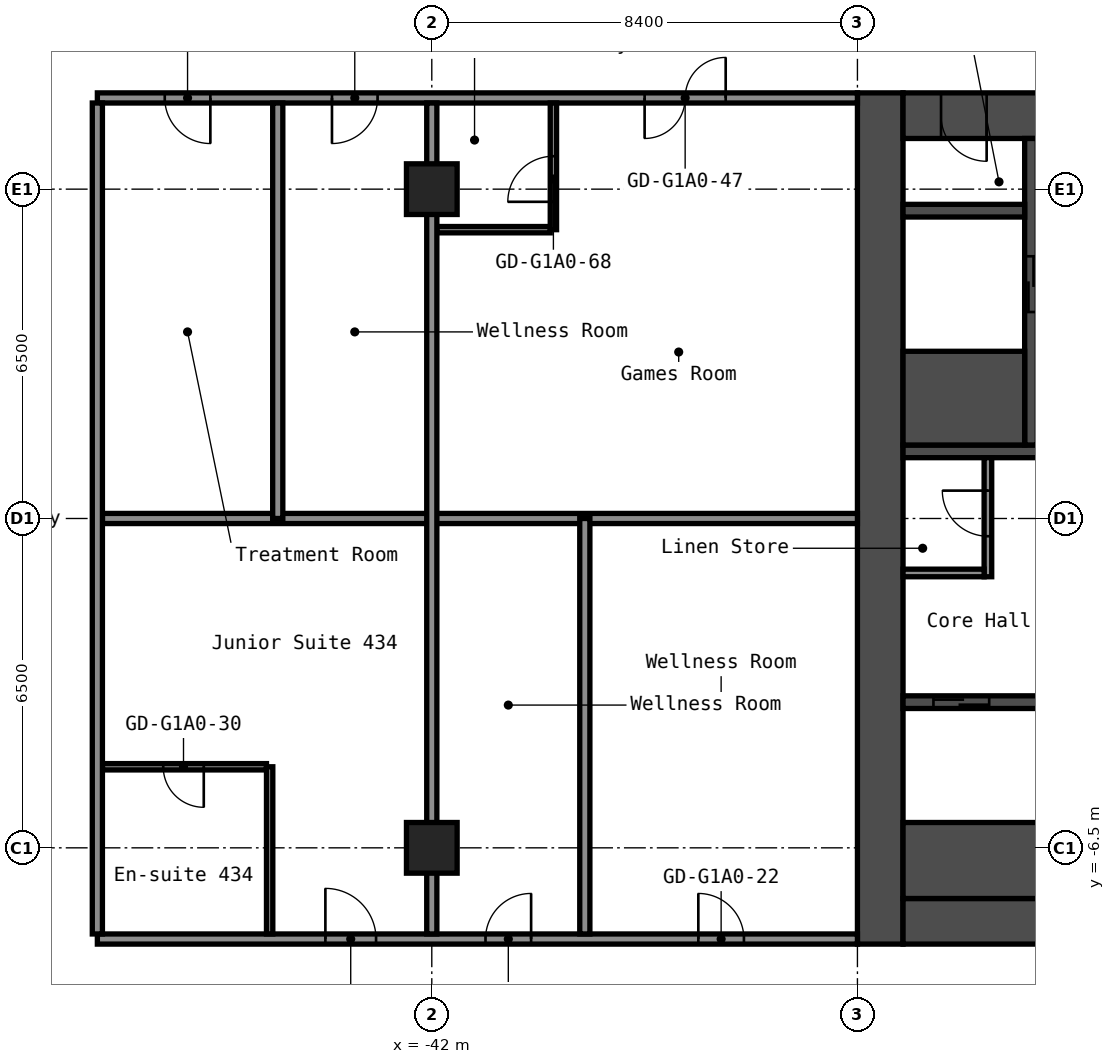
"""IFC4 building model, lengths in metres.
Left out: names, types, materials, properties, quantities, classifications, styles, units other than length and angle.
Written with IfcOpenShell. Run it as: python <this file> out.ifc"""

import sys

from ifc_helpers import new_model, si_unit, direction, frame, frame_2d, origin, origin_2d, place, context, subcontext, project, spatial, rectangle, hollow_rectangle, extrude, element, fill, save


model = new_model("IFC4")
c1 = context("Model", 3, precision=1e-05, world=origin(), true_north=direction((0.0, 1.0)))
c2 = subcontext(c1, "Body", "Model", "MODEL_VIEW")
j1 = project(units=[si_unit("LENGTHUNIT", "METRE"), si_unit("PLANEANGLEUNIT", "RADIAN")], contexts=[c1])
p1 = place(None, origin())
s1 = spatial("IfcSite", under=j1, at=p1, CompositionType="ELEMENT")
p2 = place(p1, origin())
s2 = spatial("IfcBuilding", under=s1, at=p2, CompositionType="ELEMENT")
p3 = place(p2, frame((0.0, 0.0, 19.8)))
s3 = spatial("IfcBuildingStorey", under=s2, at=p3, CompositionType="ELEMENT", Elevation=19.8)
for number, where, z_axis, x_axis in (
    (1, (-42.0, -6.5, 0.0), (0.0, 0.0, 1.0), (1.0, 0.0, 0.0)),
    (2, (-42.0, 6.5, 0.0), (0.0, 0.0, 1.0), (1.0, 0.0, 0.0)),
):
    element("IfcColumn", number, at=place(p3, frame(where, z_axis=z_axis, x_axis=x_axis)), inside=s3, PredefinedType="COLUMN", context=c2, shape_type="SweptSolid", body=[
        extrude(hollow_rectangle(XDim=1.0, YDim=1.0, WallThickness=0.04, at=origin_2d()), origin(), (0.0, 0.0, 1.0), 2.8),
    ])
p4 = place(p3, frame((-33.15, -8.4, 0.0), z_axis=(0.0, 0.0, 1.0), x_axis=(0.0, 1.0, 0.0)))
e3 = element("IfcWall", 3, at=p4, inside=s3, PredefinedType="SHEAR", context=c2, shape_type="SweptSolid", body=[
    extrude(rectangle(XDim=16.8, YDim=0.9, at=frame_2d((8.4, 0.0))), origin(), (0.0, 0.0, 1.0), 2.8),
])
p5 = place(p3, frame((-32.7, 7.95, 0.0), z_axis=(0.0, 0.0, 1.0), x_axis=(1.0, 0.0, 0.0)))
e4 = element("IfcWall", 4, at=p5, inside=s3, PredefinedType="SHEAR", context=c2, shape_type="SweptSolid", body=[
    extrude(rectangle(XDim=15.0, YDim=0.9, at=frame_2d((7.5, 0.0))), origin(), (0.0, 0.0, 1.0), 2.8),
])
p6 = place(p5, frame((3.4, 0.0, 0.0)))
e5 = element("IfcOpeningElement", 5, at=p6, cuts=e4, PredefinedType="OPENING", context=c2, shape_type="SweptSolid", body=[
    extrude(rectangle(XDim=1.2, YDim=2.1, at=frame_2d((0.6, 1.05))), frame((0.0, 0.46, 0.0), z_axis=(0.0, -1.0, 0.0), x_axis=(1.0, 0.0, 0.0)), (0.0, 0.0, 1.0), 0.92),
])
p7 = place(p5, frame((0.75, 0.0, 0.0)))
e6 = element("IfcOpeningElement", 6, at=p7, cuts=e4, PredefinedType="OPENING", context=c2, shape_type="SweptSolid", body=[
    extrude(rectangle(XDim=0.9, YDim=2.1, at=frame_2d((0.45, 1.05))), frame((0.0, 0.46, 0.0), z_axis=(0.0, -1.0, 0.0), x_axis=(1.0, 0.0, 0.0)), (0.0, 0.0, 1.0), 0.92),
])
p8 = place(p3, frame((-32.7, -7.95, 0.0), z_axis=(0.0, 0.0, 1.0), x_axis=(1.0, 0.0, 0.0)))
e7 = element("IfcWall", 7, at=p8, inside=s3, PredefinedType="SHEAR", context=c2, shape_type="SweptSolid", body=[
    extrude(rectangle(XDim=15.0, YDim=0.9, at=frame_2d((7.5, 0.0))), origin(), (0.0, 0.0, 1.0), 2.8),
])
p9 = place(p8, frame((11.45, 0.0, 0.0)))
e8 = element("IfcOpeningElement", 8, at=p9, cuts=e7, PredefinedType="OPENING", context=c2, shape_type="SweptSolid", body=[
    extrude(rectangle(XDim=1.0, YDim=2.1, at=frame_2d((0.5, 1.05))), frame((0.0, 0.46, 0.0), z_axis=(0.0, -1.0, 0.0), x_axis=(1.0, 0.0, 0.0)), (0.0, 0.0, 1.0), 0.92),
])
p10 = place(p3, frame((-32.7, 1.325, 0.0), z_axis=(0.0, 0.0, 1.0), x_axis=(1.0, 0.0, 0.0)))
e9 = element("IfcWall", 9, at=p10, inside=s3, PredefinedType="SHEAR", context=c2, shape_type="SweptSolid", body=[
    extrude(rectangle(XDim=5.05, YDim=0.25, at=frame_2d((2.525, 0.0))), origin(), (0.0, 0.0, 1.0), 2.8),
])
p11 = place(p10, frame((3.3, 0.0, 0.0)))
e10 = element("IfcOpeningElement", 10, at=p11, cuts=e9, PredefinedType="OPENING", context=c2, shape_type="SweptSolid", body=[
    extrude(rectangle(XDim=1.2, YDim=2.1, at=frame_2d((0.6, 1.05))), frame((0.0, 0.135, 0.0), z_axis=(0.0, -1.0, 0.0), x_axis=(1.0, 0.0, 0.0)), (0.0, 0.0, 1.0), 0.27),
])
p12 = place(p3, frame((-30.175, 1.45, 0.0), z_axis=(0.0, 0.0, 1.0), x_axis=(0.0, 1.0, 0.0)))
e11 = element("IfcWall", 11, at=p12, inside=s3, PredefinedType="SHEAR", context=c2, shape_type="SweptSolid", body=[
    extrude(rectangle(XDim=6.05, YDim=0.25, at=frame_2d((3.025, 0.0))), origin(), (0.0, 0.0, 1.0), 2.8),
])
p13 = place(p12, frame((2.625, 0.0, 0.0)))
e12 = element("IfcOpeningElement", 12, at=p13, cuts=e11, PredefinedType="OPENING", context=c2, shape_type="SweptSolid", body=[
    extrude(rectangle(XDim=1.1, YDim=2.1, at=frame_2d((0.55, 1.05))), frame((0.0, 0.135, 0.0), z_axis=(0.0, -1.0, 0.0), x_axis=(1.0, 0.0, 0.0)), (0.0, 0.0, 1.0), 0.27),
])
p14 = place(p3, frame((-32.7, 2.375, 0.0), z_axis=(0.0, 0.0, 1.0), x_axis=(1.0, 0.0, 0.0)))
e13 = element("IfcWall", 13, at=p14, inside=s3, PredefinedType="SHEAR", context=c2, shape_type="SweptSolid", body=[
    extrude(rectangle(XDim=2.4, YDim=1.85, at=frame_2d((1.2, 0.0))), origin(), (0.0, 0.0, 1.0), 2.8),
])
p15 = place(p3, frame((-32.7, 6.075, 0.0), z_axis=(0.0, 0.0, 1.0), x_axis=(1.0, 0.0, 0.0)))
e14 = element("IfcWall", 14, at=p15, inside=s3, PredefinedType="SHEAR", context=c2, shape_type="SweptSolid", body=[
    extrude(rectangle(XDim=2.4, YDim=0.25, at=frame_2d((1.2, 0.0))), origin(), (0.0, 0.0, 1.0), 2.8),
])
p16 = place(p3, frame((-32.7, -3.625, 0.0), z_axis=(0.0, 0.0, 1.0), x_axis=(1.0, 0.0, 0.0)))
e15 = element("IfcWall", 15, at=p16, inside=s3, PredefinedType="SHEAR", context=c2, shape_type="SweptSolid", body=[
    extrude(rectangle(XDim=4.55, YDim=0.25, at=frame_2d((2.275, 0.0))), origin(), (0.0, 0.0, 1.0), 2.8),
])
p17 = place(p16, frame((2.85, 0.0, 0.0)))
e16 = element("IfcOpeningElement", 16, at=p17, cuts=e15, PredefinedType="OPENING", context=c2, shape_type="SweptSolid", body=[
    extrude(rectangle(XDim=1.1, YDim=2.1, at=frame_2d((0.55, 1.05))), frame((0.0, 0.135, 0.0), z_axis=(0.0, -1.0, 0.0), x_axis=(1.0, 0.0, 0.0)), (0.0, 0.0, 1.0), 0.27),
])
p18 = place(p16, frame((0.6, 0.0, 0.0)))
e17 = element("IfcOpeningElement", 17, at=p18, cuts=e15, PredefinedType="OPENING", context=c2, shape_type="SweptSolid", body=[
    extrude(rectangle(XDim=1.1, YDim=2.1, at=frame_2d((0.55, 1.05))), frame((0.0, 0.135, 0.0), z_axis=(0.0, -1.0, 0.0), x_axis=(1.0, 0.0, 0.0)), (0.0, 0.0, 1.0), 0.27),
])
p19 = place(p3, frame((-32.7, -6.75, 0.0), z_axis=(0.0, 0.0, 1.0), x_axis=(1.0, 0.0, 0.0)))
e18 = element("IfcWall", 18, at=p19, inside=s3, PredefinedType="SHEAR", context=c2, shape_type="SweptSolid", body=[
    extrude(rectangle(XDim=4.55, YDim=1.5, at=frame_2d((2.275, 0.0))), origin(), (0.0, 0.0, 1.0), 2.8),
])
p20 = place(p3, frame((-31.025, -1.15, 0.0), z_axis=(0.0, 0.0, 1.0), x_axis=(0.0, 1.0, 0.0)))
e19 = element("IfcWall", 19, at=p20, inside=s3, PredefinedType="PARTITIONING", context=c2, shape_type="SweptSolid", body=[
    extrude(rectangle(XDim=2.35, YDim=0.15, at=frame_2d((1.175, 0.0))), origin(), (0.0, 0.0, 1.0), 2.8),
])
p21 = place(p20, frame((0.8, 0.0, 0.0)))
e20 = element("IfcOpeningElement", 20, at=p21, cuts=e19, PredefinedType="OPENING", context=c2, shape_type="SweptSolid", body=[
    extrude(rectangle(XDim=0.9, YDim=2.1, at=frame_2d((0.45, 1.05))), frame((0.0, 0.085, 0.0), z_axis=(0.0, -1.0, 0.0), x_axis=(1.0, 0.0, 0.0)), (0.0, 0.0, 1.0), 0.17),
])
p22 = place(p3, frame((-32.7, -1.075, 0.0), z_axis=(0.0, 0.0, 1.0), x_axis=(1.0, 0.0, 0.0)))
e21 = element("IfcWall", 21, at=p22, inside=s3, PredefinedType="PARTITIONING", context=c2, shape_type="SweptSolid", body=[
    extrude(rectangle(XDim=1.6, YDim=0.15, at=frame_2d((0.8, 0.0))), origin(), (0.0, 0.0, 1.0), 2.8),
])
p23 = place(p3, frame((-48.6, -8.3, 0.0), z_axis=(0.0, 0.0, 1.0), x_axis=(1.0, 0.0, 0.0)))
e22 = element("IfcWall", 22, at=p23, inside=s3, PredefinedType="PARTITIONING", context=c2, shape_type="SweptSolid", body=[
    extrude(rectangle(XDim=15.0, YDim=0.2, at=frame_2d((7.5, 0.0))), origin(), (0.0, 0.0, 1.0), 2.8),
])
p24 = place(p23, frame((4.5, 0.0, 0.0)))
e23 = element("IfcOpeningElement", 23, at=p24, cuts=e22, PredefinedType="OPENING", context=c2, shape_type="SweptSolid", body=[
    extrude(rectangle(XDim=1.0, YDim=2.1, at=frame_2d((0.5, 1.05))), frame((0.0, 0.11, 0.0), z_axis=(0.0, -1.0, 0.0), x_axis=(1.0, 0.0, 0.0)), (0.0, 0.0, 1.0), 0.22),
])
p25 = place(p23, frame((7.66, 0.0, 0.0)))
e24 = element("IfcOpeningElement", 24, at=p25, cuts=e22, PredefinedType="OPENING", context=c2, shape_type="SweptSolid", body=[
    extrude(rectangle(XDim=0.9, YDim=2.1, at=frame_2d((0.45, 1.05))), frame((0.0, 0.11, 0.0), z_axis=(0.0, -1.0, 0.0), x_axis=(1.0, 0.0, 0.0)), (0.0, 0.0, 1.0), 0.22),
])
p26 = place(p23, frame((11.86, 0.0, 0.0)))
e25 = element("IfcOpeningElement", 25, at=p26, cuts=e22, PredefinedType="OPENING", context=c2, shape_type="SweptSolid", body=[
    extrude(rectangle(XDim=0.9, YDim=2.1, at=frame_2d((0.45, 1.05))), frame((0.0, 0.11, 0.0), z_axis=(0.0, -1.0, 0.0), x_axis=(1.0, 0.0, 0.0)), (0.0, 0.0, 1.0), 0.22),
])
p27 = place(p3, frame((-48.5, -4.9, 0.0), z_axis=(0.0, 0.0, 1.0), x_axis=(1.0, 0.0, 0.0)))
e26 = element("IfcWall", 26, at=p27, inside=s3, PredefinedType="PARTITIONING", context=c2, shape_type="SweptSolid", body=[
    extrude(rectangle(XDim=3.238, YDim=0.125, at=frame_2d((1.619, 0.0))), origin(), (0.0, 0.0, 1.0), 2.8),
])
p28 = place(p27, frame((1.2, 0.0, 0.0)))
e27 = element("IfcOpeningElement", 27, at=p28, cuts=e26, PredefinedType="OPENING", context=c2, shape_type="SweptSolid", body=[
    extrude(rectangle(XDim=0.8, YDim=2.1, at=frame_2d((0.4, 1.05))), frame((0.0, 0.073, 0.0), z_axis=(0.0, -1.0, 0.0), x_axis=(1.0, 0.0, 0.0)), (0.0, 0.0, 1.0), 0.145),
])
p29 = place(p3, frame((-48.5, 0.0, 0.0), z_axis=(0.0, 0.0, 1.0), x_axis=(1.0, 0.0, 0.0)))
e28 = element("IfcWall", 28, at=p29, inside=s3, PredefinedType="PARTITIONING", context=c2, shape_type="SweptSolid", body=[
    extrude(rectangle(XDim=14.9, YDim=0.2, at=frame_2d((7.45, 0.0))), origin(), (0.0, 0.0, 1.0), 2.8),
])
p30 = place(p3, frame((-41.9, 5.7, 0.0), z_axis=(0.0, 0.0, 1.0), x_axis=(1.0, 0.0, 0.0)))
e29 = element("IfcWall", 29, at=p30, inside=s3, PredefinedType="PARTITIONING", context=c2, shape_type="SweptSolid", body=[
    extrude(rectangle(XDim=2.237, YDim=0.125, at=frame_2d((1.119, 0.0))), origin(), (0.0, 0.0, 1.0), 2.8),
])
p31 = place(p3, frame((-48.6, 8.3, 0.0), z_axis=(0.0, 0.0, 1.0), x_axis=(1.0, 0.0, 0.0)))
e30 = element("IfcWall", 30, at=p31, inside=s3, PredefinedType="PARTITIONING", context=c2, shape_type="SweptSolid", body=[
    extrude(rectangle(XDim=15.0, YDim=0.2, at=frame_2d((7.5, 0.0))), origin(), (0.0, 0.0, 1.0), 2.8),
])
p32 = place(p31, frame((1.33, 0.0, 0.0)))
e31 = element("IfcOpeningElement", 31, at=p32, cuts=e30, PredefinedType="OPENING", context=c2, shape_type="SweptSolid", body=[
    extrude(rectangle(XDim=0.9, YDim=2.1, at=frame_2d((0.45, 1.05))), frame((0.0, 0.11, 0.0), z_axis=(0.0, -1.0, 0.0), x_axis=(1.0, 0.0, 0.0)), (0.0, 0.0, 1.0), 0.22),
])
p33 = place(p31, frame((4.63, 0.0, 0.0)))
e32 = element("IfcOpeningElement", 32, at=p33, cuts=e30, PredefinedType="OPENING", context=c2, shape_type="SweptSolid", body=[
    extrude(rectangle(XDim=0.9, YDim=2.1, at=frame_2d((0.45, 1.05))), frame((0.0, 0.11, 0.0), z_axis=(0.0, -1.0, 0.0), x_axis=(1.0, 0.0, 0.0)), (0.0, 0.0, 1.0), 0.22),
])
p34 = place(p31, frame((10.8, 0.0, 0.0)))
e33 = element("IfcOpeningElement", 33, at=p34, cuts=e30, PredefinedType="OPENING", context=c2, shape_type="SweptSolid", body=[
    extrude(rectangle(XDim=1.6, YDim=2.1, at=frame_2d((0.8, 1.05))), frame((0.0, 0.11, 0.0), z_axis=(0.0, -1.0, 0.0), x_axis=(1.0, 0.0, 0.0)), (0.0, 0.0, 1.0), 0.22),
])
p35 = place(p3, frame((-48.6, -8.2, 0.0), z_axis=(0.0, 0.0, 1.0), x_axis=(0.0, 1.0, 0.0)))
e34 = element("IfcWall", 34, at=p35, inside=s3, PredefinedType="PARTITIONING", context=c2, shape_type="SweptSolid", body=[
    extrude(rectangle(XDim=16.4, YDim=0.2, at=frame_2d((8.2, 0.0))), origin(), (0.0, 0.0, 1.0), 2.8),
])
p36 = place(p3, frame((-45.2, -8.2, 0.0), z_axis=(0.0, 0.0, 1.0), x_axis=(0.0, 1.0, 0.0)))
e35 = element("IfcWall", 35, at=p36, inside=s3, PredefinedType="PARTITIONING", context=c2, shape_type="SweptSolid", body=[
    extrude(rectangle(XDim=3.3, YDim=0.125, at=frame_2d((1.65, 0.0))), origin(), (0.0, 0.0, 1.0), 2.8),
])
p37 = place(p3, frame((-45.04, 0.0, 0.0), z_axis=(0.0, 0.0, 1.0), x_axis=(0.0, 1.0, 0.0)))
e36 = element("IfcWall", 36, at=p37, inside=s3, PredefinedType="PARTITIONING", context=c2, shape_type="SweptSolid", body=[
    extrude(rectangle(XDim=8.2, YDim=0.2, at=frame_2d((4.1, 0.0))), origin(), (0.0, 0.0, 1.0), 2.8),
])
p38 = place(p3, frame((-42.0, -8.2, 0.0), z_axis=(0.0, 0.0, 1.0), x_axis=(0.0, 1.0, 0.0)))
e37 = element("IfcWall", 37, at=p38, inside=s3, PredefinedType="PARTITIONING", context=c2, shape_type="SweptSolid", body=[
    extrude(rectangle(XDim=16.4, YDim=0.2, at=frame_2d((8.2, 0.0))), origin(), (0.0, 0.0, 1.0), 2.8),
])
p39 = place(p3, frame((-39.6, 5.7, 0.0), z_axis=(0.0, 0.0, 1.0), x_axis=(0.0, 1.0, 0.0)))
e38 = element("IfcWall", 38, at=p39, inside=s3, PredefinedType="PARTITIONING", context=c2, shape_type="SweptSolid", body=[
    extrude(rectangle(XDim=2.5, YDim=0.125, at=frame_2d((1.25, 0.0))), origin(), (0.0, 0.0, 1.0), 2.8),
])
p40 = place(p39, frame((0.55, 0.0, 0.0)))
e39 = element("IfcOpeningElement", 39, at=p40, cuts=e38, PredefinedType="OPENING", context=c2, shape_type="SweptSolid", body=[
    extrude(rectangle(XDim=0.9, YDim=2.1, at=frame_2d((0.45, 1.05))), frame((0.0, 0.073, 0.0), z_axis=(0.0, -1.0, 0.0), x_axis=(1.0, 0.0, 0.0)), (0.0, 0.0, 1.0), 0.145),
])
p41 = place(p3, frame((-38.98, -8.2, 0.0), z_axis=(0.0, 0.0, 1.0), x_axis=(0.0, 1.0, 0.0)))
e40 = element("IfcWall", 40, at=p41, inside=s3, PredefinedType="PARTITIONING", context=c2, shape_type="SweptSolid", body=[
    extrude(rectangle(XDim=8.2, YDim=0.2, at=frame_2d((4.1, 0.0))), origin(), (0.0, 0.0, 1.0), 2.8),
])
p42 = place(p7, origin())
e41 = element("IfcDoor", 41, at=p42, inside=s3, OperationType="SINGLE_SWING_RIGHT", PredefinedType="DOOR", context=c2, shape_type="SweptSolid", body=[
    extrude(rectangle(XDim=0.9, YDim=2.1, at=frame_2d((0.45, 1.05))), frame((0.0, 0.025, 0.0), z_axis=(0.0, -1.0, 0.0), x_axis=(1.0, 0.0, 0.0)), (0.0, 0.0, 1.0), 0.05),
])
fill(e6, e41)
p43 = place(p21, origin())
e42 = element("IfcDoor", 42, at=p43, inside=s3, OperationType="SINGLE_SWING_LEFT", PredefinedType="DOOR", context=c2, shape_type="SweptSolid", body=[
    extrude(rectangle(XDim=0.9, YDim=2.1, at=frame_2d((0.45, 1.05))), frame((0.0, 0.025, 0.0), z_axis=(0.0, -1.0, 0.0), x_axis=(1.0, 0.0, 0.0)), (0.0, 0.0, 1.0), 0.05),
])
fill(e20, e42)
p44 = place(p13, origin())
e43 = element("IfcDoor", 43, at=p44, inside=s3, OperationType="DOUBLE_DOOR_SLIDING", PredefinedType="DOOR", context=c2, shape_type="SweptSolid", body=[
    extrude(rectangle(XDim=1.1, YDim=2.1, at=frame_2d((0.55, 1.05))), frame((0.0, 0.025, 0.0), z_axis=(0.0, -1.0, 0.0), x_axis=(1.0, 0.0, 0.0)), (0.0, 0.0, 1.0), 0.05),
])
fill(e12, e43)
p45 = place(p18, origin())
e44 = element("IfcDoor", 44, at=p45, inside=s3, OperationType="DOUBLE_DOOR_SLIDING", PredefinedType="DOOR", context=c2, shape_type="SweptSolid", body=[
    extrude(rectangle(XDim=1.1, YDim=2.1, at=frame_2d((0.55, 1.05))), frame((0.0, 0.025, 0.0), z_axis=(0.0, -1.0, 0.0), x_axis=(1.0, 0.0, 0.0)), (0.0, 0.0, 1.0), 0.05),
])
fill(e17, e44)
p46 = place(p24, origin())
e45 = element("IfcDoor", 45, at=p46, inside=s3, OperationType="SINGLE_SWING_RIGHT", PredefinedType="DOOR", context=c2, shape_type="SweptSolid", body=[
    extrude(rectangle(XDim=1.0, YDim=2.1, at=frame_2d((0.5, 1.05))), frame((0.0, 0.025, 0.0), z_axis=(0.0, -1.0, 0.0), x_axis=(1.0, 0.0, 0.0)), (0.0, 0.0, 1.0), 0.05),
])
fill(e23, e45)
p47 = place(p25, origin())
e46 = element("IfcDoor", 46, at=p47, inside=s3, OperationType="SINGLE_SWING_LEFT", PredefinedType="DOOR", context=c2, shape_type="SweptSolid", body=[
    extrude(rectangle(XDim=0.9, YDim=2.1, at=frame_2d((0.45, 1.05))), frame((0.0, 0.025, 0.0), z_axis=(0.0, -1.0, 0.0), x_axis=(1.0, 0.0, 0.0)), (0.0, 0.0, 1.0), 0.05),
])
fill(e24, e46)
p48 = place(p26, origin())
e47 = element("IfcDoor", 47, at=p48, inside=s3, OperationType="SINGLE_SWING_RIGHT", PredefinedType="DOOR", context=c2, shape_type="SweptSolid", body=[
    extrude(rectangle(XDim=0.9, YDim=2.1, at=frame_2d((0.45, 1.05))), frame((0.0, 0.025, 0.0), z_axis=(0.0, -1.0, 0.0), x_axis=(1.0, 0.0, 0.0)), (0.0, 0.0, 1.0), 0.05),
])
fill(e25, e47)
p49 = place(p28, origin())
e48 = element("IfcDoor", 48, at=p49, inside=s3, OperationType="SINGLE_SWING_RIGHT", PredefinedType="DOOR", context=c2, shape_type="SweptSolid", body=[
    extrude(rectangle(XDim=0.8, YDim=2.1, at=frame_2d((0.4, 1.05))), frame((0.0, 0.025, 0.0), z_axis=(0.0, -1.0, 0.0), x_axis=(1.0, 0.0, 0.0)), (0.0, 0.0, 1.0), 0.05),
])
fill(e27, e48)
p50 = place(p32, origin())
e49 = element("IfcDoor", 49, at=p50, inside=s3, OperationType="SINGLE_SWING_RIGHT", PredefinedType="DOOR", context=c2, shape_type="SweptSolid", body=[
    extrude(rectangle(XDim=0.9, YDim=2.1, at=frame_2d((0.45, 1.05))), frame((0.0, 0.025, 0.0), z_axis=(0.0, -1.0, 0.0), x_axis=(1.0, 0.0, 0.0)), (0.0, 0.0, 1.0), 0.05),
])
fill(e31, e49)
p51 = place(p33, origin())
e50 = element("IfcDoor", 50, at=p51, inside=s3, OperationType="SINGLE_SWING_LEFT", PredefinedType="DOOR", context=c2, shape_type="SweptSolid", body=[
    extrude(rectangle(XDim=0.9, YDim=2.1, at=frame_2d((0.45, 1.05))), frame((0.0, 0.025, 0.0), z_axis=(0.0, -1.0, 0.0), x_axis=(1.0, 0.0, 0.0)), (0.0, 0.0, 1.0), 0.05),
])
fill(e32, e50)
p52 = place(p34, origin())
e51 = element("IfcDoor", 51, at=p52, inside=s3, OperationType="DOUBLE_DOOR_SINGLE_SWING", PredefinedType="DOOR", context=c2, shape_type="SweptSolid", body=[
    extrude(rectangle(XDim=1.6, YDim=2.1, at=frame_2d((0.8, 1.05))), frame((0.0, 0.025, 0.0), z_axis=(0.0, -1.0, 0.0), x_axis=(1.0, 0.0, 0.0)), (0.0, 0.0, 1.0), 0.05),
])
fill(e33, e51)
p53 = place(p40, origin())
e52 = element("IfcDoor", 52, at=p53, inside=s3, OperationType="SINGLE_SWING_RIGHT", PredefinedType="DOOR", context=c2, shape_type="SweptSolid", body=[
    extrude(rectangle(XDim=0.9, YDim=2.1, at=frame_2d((0.45, 1.05))), frame((0.0, 0.025, 0.0), z_axis=(0.0, -1.0, 0.0), x_axis=(1.0, 0.0, 0.0)), (0.0, 0.0, 1.0), 0.05),
])
fill(e39, e52)
save(model, sys.argv[1])
